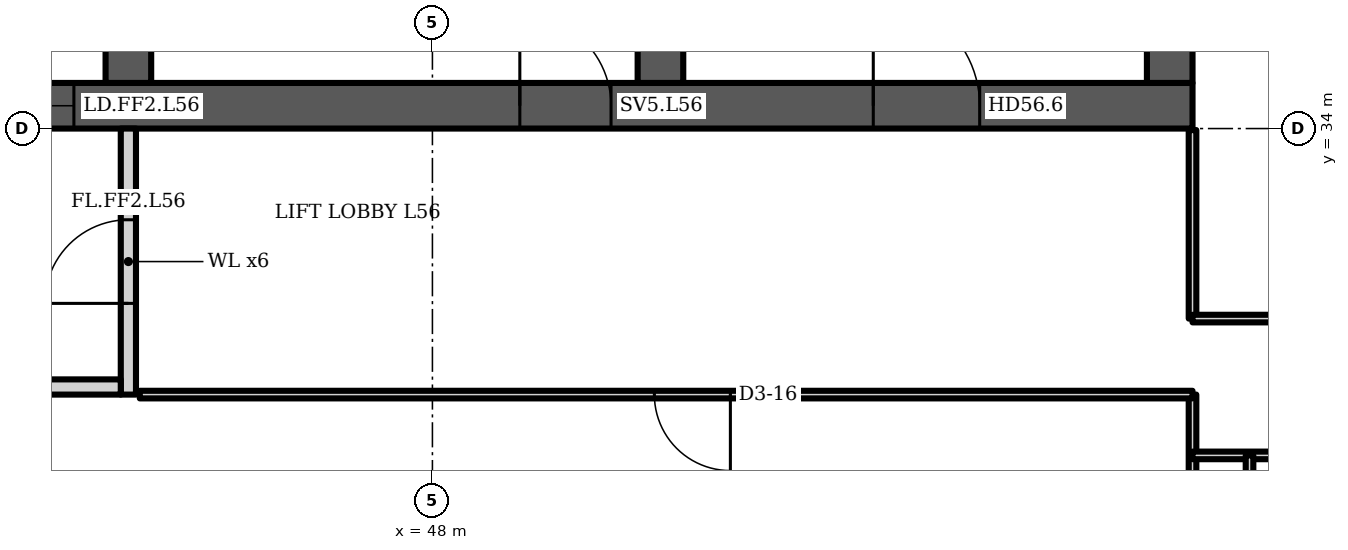
"""IFC4 building model, lengths in metres.
Left out: names, types, materials, properties, quantities, classifications, styles, units other than length and angle.
Written with IfcOpenShell. Run it as: python <this file> out.ifc"""

import sys

from ifc_helpers import new_model, si_unit, direction, frame, frame_2d, origin, place, context, subcontext, project, spatial, polyline, rectangle, outline, extrude, element, fill, save


model = new_model("IFC4")
c1 = context("Model", 3, precision=1e-05, world=origin(), true_north=direction((0.0, 1.0)))
c2 = subcontext(c1, "Body", "Model", "MODEL_VIEW")
j1 = project(units=[si_unit("LENGTHUNIT", "METRE"), si_unit("PLANEANGLEUNIT", "RADIAN")], contexts=[c1])
p1 = place(None, origin())
s1 = spatial("IfcSite", under=j1, at=p1, CompositionType="ELEMENT")
p2 = place(p1, origin())
s2 = spatial("IfcBuilding", under=s1, at=p2, CompositionType="ELEMENT")
p3 = place(p2, frame((0.0, 0.0, 225.1)))
s3 = spatial("IfcBuildingStorey", under=s2, at=p3, CompositionType="ELEMENT", Elevation=225.1)
p4 = place(p3, frame((23.0, 34.3, 0.0), z_axis=(0.0, 0.0, 1.0), x_axis=(1.0, 0.0, 0.0)))
e1 = element("IfcWall", 1, at=p4, inside=s3, PredefinedType="SHEAR", context=c2, shape_type="SweptSolid", body=[
    extrude(rectangle(XDim=35.0, YDim=0.6, at=frame_2d((17.5, 0.0))), origin(), (0.0, 0.0, 1.0), 3.6),
])
p5 = place(p4, frame((0.65, 0.0, 0.0)))
e2 = element("IfcOpeningElement", 2, at=p5, cuts=e1, PredefinedType="OPENING", context=c2, shape_type="SweptSolid", body=[
    extrude(rectangle(XDim=1.2, YDim=2.1, at=frame_2d((0.6, 1.05))), frame((0.0, 0.31, 0.0), z_axis=(0.0, -1.0, 0.0), x_axis=(1.0, 0.0, 0.0)), (0.0, 0.0, 1.0), 0.62),
])
p6 = place(p4, frame((7.717, 0.0, 0.0)))
e3 = element("IfcOpeningElement", 3, at=p6, cuts=e1, PredefinedType="OPENING", context=c2, shape_type="SweptSolid", body=[
    extrude(rectangle(XDim=1.1, YDim=2.1, at=frame_2d((0.55, 1.05))), frame((0.0, 0.31, 0.0), z_axis=(0.0, -1.0, 0.0), x_axis=(1.0, 0.0, 0.0)), (0.0, 0.0, 1.0), 0.62),
])
p7 = place(p4, frame((12.183, 0.0, 0.0)))
e4 = element("IfcOpeningElement", 4, at=p7, cuts=e1, PredefinedType="OPENING", context=c2, shape_type="SweptSolid", body=[
    extrude(rectangle(XDim=1.1, YDim=2.1, at=frame_2d((0.55, 1.05))), frame((0.0, 0.31, 0.0), z_axis=(0.0, -1.0, 0.0), x_axis=(1.0, 0.0, 0.0)), (0.0, 0.0, 1.0), 0.62),
])
p8 = place(p4, frame((9.8, 0.0, 0.0)))
e5 = element("IfcOpeningElement", 5, at=p8, cuts=e1, PredefinedType="OPENING", context=c2, shape_type="SweptSolid", body=[
    extrude(rectangle(XDim=1.4, YDim=2.1, at=frame_2d((0.7, 1.05))), frame((0.0, 0.31, 0.0), z_axis=(0.0, -1.0, 0.0), x_axis=(1.0, 0.0, 0.0)), (0.0, 0.0, 1.0), 0.62),
])
p9 = place(p4, frame((14.717, 0.0, 0.0)))
e6 = element("IfcOpeningElement", 6, at=p9, cuts=e1, PredefinedType="OPENING", context=c2, shape_type="SweptSolid", body=[
    extrude(rectangle(XDim=1.1, YDim=2.1, at=frame_2d((0.55, 1.05))), frame((0.0, 0.31, 0.0), z_axis=(0.0, -1.0, 0.0), x_axis=(1.0, 0.0, 0.0)), (0.0, 0.0, 1.0), 0.62),
])
p10 = place(p4, frame((16.95, 0.0, 0.0)))
e7 = element("IfcOpeningElement", 7, at=p10, cuts=e1, PredefinedType="OPENING", context=c2, shape_type="SweptSolid", body=[
    extrude(rectangle(XDim=1.1, YDim=2.1, at=frame_2d((0.55, 1.05))), frame((0.0, 0.31, 0.0), z_axis=(0.0, -1.0, 0.0), x_axis=(1.0, 0.0, 0.0)), (0.0, 0.0, 1.0), 0.62),
])
p11 = place(p4, frame((19.183, 0.0, 0.0)))
e8 = element("IfcOpeningElement", 8, at=p11, cuts=e1, PredefinedType="OPENING", context=c2, shape_type="SweptSolid", body=[
    extrude(rectangle(XDim=1.1, YDim=2.1, at=frame_2d((0.55, 1.05))), frame((0.0, 0.31, 0.0), z_axis=(0.0, -1.0, 0.0), x_axis=(1.0, 0.0, 0.0)), (0.0, 0.0, 1.0), 0.62),
])
p12 = place(p4, frame((26.15, 0.0, 0.0)))
e9 = element("IfcOpeningElement", 9, at=p12, cuts=e1, PredefinedType="OPENING", context=c2, shape_type="SweptSolid", body=[
    extrude(rectangle(XDim=1.2, YDim=2.1, at=frame_2d((0.6, 1.05))), frame((0.0, 0.31, 0.0), z_axis=(0.0, -1.0, 0.0), x_axis=(1.0, 0.0, 0.0)), (0.0, 0.0, 1.0), 0.62),
])
p13 = place(p4, frame((30.8, 0.0, 0.0)))
e10 = element("IfcOpeningElement", 10, at=p13, cuts=e1, PredefinedType="OPENING", context=c2, shape_type="SweptSolid", body=[
    extrude(rectangle(XDim=1.4, YDim=2.1, at=frame_2d((0.7, 1.05))), frame((0.0, 0.31, 0.0), z_axis=(0.0, -1.0, 0.0), x_axis=(1.0, 0.0, 0.0)), (0.0, 0.0, 1.0), 0.62),
])
p14 = place(p3, frame((44.0, 34.6, 0.0), z_axis=(0.0, 0.0, 1.0), x_axis=(0.0, 1.0, 0.0)))
e11 = element("IfcWall", 11, at=p14, inside=s3, PredefinedType="SHEAR", context=c2, shape_type="SweptSolid", body=[
    extrude(rectangle(XDim=14.784, YDim=0.6, at=frame_2d((7.392, 0.0))), origin(), (0.0, 0.0, 1.0), 3.6),
])
p15 = place(p14, frame((11.608, 0.0, 0.0)))
e12 = element("IfcOpeningElement", 12, at=p15, cuts=e11, PredefinedType="OPENING", context=c2, shape_type="SweptSolid", body=[
    extrude(rectangle(XDim=1.0, YDim=2.1, at=frame_2d((0.5, 1.05))), frame((0.0, 0.31, 0.0), z_axis=(0.0, -1.0, 0.0), x_axis=(1.0, 0.0, 0.0)), (0.0, 0.0, 1.0), 0.62),
])
p16 = place(p14, frame((3.8, 0.0, 0.0)))
e13 = element("IfcOpeningElement", 13, at=p16, cuts=e11, PredefinedType="OPENING", context=c2, shape_type="SweptSolid", body=[
    extrude(rectangle(XDim=1.1, YDim=2.1, at=frame_2d((0.55, 1.05))), frame((0.0, 0.31, 0.0), z_axis=(0.0, -1.0, 0.0), x_axis=(1.0, 0.0, 0.0)), (0.0, 0.0, 1.0), 0.62),
])
p17 = place(p3, frame((51.0, 34.6, 0.0), z_axis=(0.0, 0.0, 1.0), x_axis=(0.0, 1.0, 0.0)))
e14 = element("IfcWall", 14, at=p17, inside=s3, PredefinedType="SHEAR", context=c2, shape_type="SweptSolid", body=[
    extrude(rectangle(XDim=14.171, YDim=0.6, at=frame_2d((7.085, 0.0))), origin(), (0.0, 0.0, 1.0), 3.6),
])
p18 = place(p17, frame((3.8, 0.0, 0.0)))
e15 = element("IfcOpeningElement", 15, at=p18, cuts=e14, PredefinedType="OPENING", context=c2, shape_type="SweptSolid", body=[
    extrude(rectangle(XDim=1.1, YDim=2.1, at=frame_2d((0.55, 1.05))), frame((0.0, 0.31, 0.0), z_axis=(0.0, -1.0, 0.0), x_axis=(1.0, 0.0, 0.0)), (0.0, 0.0, 1.0), 0.62),
])
p19 = place(p3, frame((57.7, 34.6, 0.0), z_axis=(0.0, 0.0, 1.0), x_axis=(0.0, 1.0, 0.0)))
e16 = element("IfcWall", 16, at=p19, inside=s3, PredefinedType="SHEAR", context=c2, shape_type="SweptSolid", body=[
    extrude(rectangle(XDim=13.585, YDim=0.6, at=frame_2d((6.792, 0.0))), origin(), (0.0, 0.0, 1.0), 3.6),
])
p20 = place(p3, frame((0.0, 0.0, -0.0)))
e17 = element("IfcWall", 17, at=p20, inside=s3, PredefinedType="PARTITIONING", context=c2, shape_type="SweptSolid", body=[
    extrude(outline(polyline([(41.567, 37.1), (39.433, 37.1), (39.433, 34.6), (39.233, 34.6), (39.233, 37.45), (37.3, 37.45), (37.3, 37.65), (39.233, 37.65), (39.433, 37.65), (39.433, 37.3), (41.567, 37.3), (41.567, 37.35), (41.767, 37.35), (43.7, 37.35), (43.7, 37.15), (41.767, 37.15), (41.767, 34.6), (41.567, 34.6), (41.567, 37.1)])), origin(), (0.0, 0.0, 1.0), 3.2),
])
p21 = place(p3, frame((44.0, 30.5, 0.0), z_axis=(0.0, 0.0, 1.0), x_axis=(0.0, 1.0, 0.0)))
e18 = element("IfcWall", 18, at=p21, inside=s3, PredefinedType="PARTITIONING", context=c2, shape_type="SweptSolid", body=[
    extrude(rectangle(XDim=3.5, YDim=0.2, at=frame_2d((1.75, 0.0))), origin(), (0.0, 0.0, 1.0), 3.2),
])
p22 = place(p21, frame((1.2, 0.0, 0.0)))
e19 = element("IfcOpeningElement", 19, at=p22, cuts=e18, PredefinedType="OPENING", context=c2, shape_type="SweptSolid", body=[
    extrude(rectangle(XDim=1.1, YDim=2.1, at=frame_2d((0.55, 1.05))), frame((0.0, 0.11, 0.0), z_axis=(0.0, -1.0, 0.0), x_axis=(1.0, 0.0, 0.0)), (0.0, 0.0, 1.0), 0.22),
])
p23 = place(p3, frame((41.1, 30.6, 0.0), z_axis=(0.0, 0.0, 1.0), x_axis=(1.0, 0.0, 0.0)))
e20 = element("IfcWall", 20, at=p23, inside=s3, PredefinedType="PARTITIONING", context=c2, shape_type="SweptSolid", body=[
    extrude(rectangle(XDim=2.8, YDim=0.2, at=frame_2d((1.4, 0.0))), origin(), (0.0, 0.0, 1.0), 3.2),
])
p24 = place(p3, frame((58.0, 17.0, 0.0), z_axis=(0.0, 0.0, 1.0), x_axis=(0.0, 1.0, 0.0)))
e21 = element("IfcWall", 21, at=p24, inside=s3, PredefinedType="PARTITIONING", context=c2, shape_type="SweptSolid", body=[
    extrude(rectangle(XDim=13.5, YDim=0.1, at=frame_2d((6.75, 0.0))), origin(), (0.0, 0.0, 1.0), 3.2),
])
p25 = place(p3, frame((58.0, 29.7, 0.0), z_axis=(0.0, 0.0, 1.0), x_axis=(1.0, 0.0, 0.0)))
e22 = element("IfcWall", 22, at=p25, inside=s3, PredefinedType="PARTITIONING", context=c2, shape_type="SweptSolid", body=[
    extrude(rectangle(XDim=3.58, YDim=0.1, at=frame_2d((1.79, 0.0))), origin(), (0.0, 0.0, 1.0), 3.2),
])
p26 = place(p3, frame((58.0, 31.5, 0.0), z_axis=(0.0, 0.0, 1.0), x_axis=(0.0, 1.0, 0.0)))
e23 = element("IfcWall", 23, at=p26, inside=s3, PredefinedType="PARTITIONING", context=c2, shape_type="SweptSolid", body=[
    extrude(rectangle(XDim=2.48, YDim=0.1, at=frame_2d((1.24, 0.0))), origin(), (0.0, 0.0, 1.0), 3.2),
])
p27 = place(p3, frame((58.0, 31.5, 0.0), z_axis=(0.0, 0.0, 1.0), x_axis=(1.0, 0.0, 0.0)))
e24 = element("IfcWall", 24, at=p27, inside=s3, PredefinedType="PARTITIONING", context=c2, shape_type="SweptSolid", body=[
    extrude(rectangle(XDim=5.38, YDim=0.1, at=frame_2d((2.69, 0.0))), origin(), (0.0, 0.0, 1.0), 3.2),
])
p28 = place(p27, frame((4.135, 0.0, 0.0)))
e25 = element("IfcOpeningElement", 25, at=p28, cuts=e24, PredefinedType="OPENING", context=c2, shape_type="SweptSolid", body=[
    extrude(rectangle(XDim=1.0, YDim=2.1, at=frame_2d((0.5, 1.05))), frame((0.0, 0.06, 0.0), z_axis=(0.0, -1.0, 0.0), x_axis=(1.0, 0.0, 0.0)), (0.0, 0.0, 1.0), 0.12),
])
p29 = place(p3, frame((58.75, 23.35, 0.0), z_axis=(0.0, 0.0, 1.0), x_axis=(0.0, 1.0, 0.0)))
e26 = element("IfcWall", 26, at=p29, inside=s3, PredefinedType="PARTITIONING", context=c2, shape_type="SweptSolid", body=[
    extrude(rectangle(XDim=6.35, YDim=0.1, at=frame_2d((3.175, 0.0))), origin(), (0.0, 0.0, 1.0), 3.2),
])
p30 = place(p3, frame((44.15, 30.5, 0.0), z_axis=(0.0, 0.0, 1.0), x_axis=(1.0, 0.0, 0.0)))
e27 = element("IfcWall", 27, at=p30, inside=s3, PredefinedType="PARTITIONING", context=c2, shape_type="SweptSolid", body=[
    extrude(rectangle(XDim=13.85, YDim=0.1, at=frame_2d((6.925, 0.0))), origin(), (0.0, 0.0, 1.0), 3.2),
])
p31 = place(p30, frame((6.77, 0.0, 0.0)))
e28 = element("IfcOpeningElement", 28, at=p31, cuts=e27, PredefinedType="OPENING", context=c2, shape_type="SweptSolid", body=[
    extrude(rectangle(XDim=1.0, YDim=2.1, at=frame_2d((0.5, 1.05))), frame((0.0, 0.06, 0.0), z_axis=(0.0, -1.0, 0.0), x_axis=(1.0, 0.0, 0.0)), (0.0, 0.0, 1.0), 0.12),
])
p32 = place(p11, origin())
e29 = element("IfcDoor", 29, at=p32, inside=s3, OperationType="DOUBLE_DOOR_SLIDING", PredefinedType="DOOR", context=c2, shape_type="SweptSolid", body=[
    extrude(rectangle(XDim=1.1, YDim=2.1, at=frame_2d((0.55, 1.05))), frame((0.0, 0.025, 0.0), z_axis=(0.0, -1.0, 0.0), x_axis=(1.0, 0.0, 0.0)), (0.0, 0.0, 1.0), 0.05),
])
fill(e8, e29)
p33 = place(p12, origin())
e30 = element("IfcDoor", 30, at=p33, inside=s3, OperationType="SINGLE_SWING_LEFT", PredefinedType="DOOR", context=c2, shape_type="SweptSolid", body=[
    extrude(rectangle(XDim=1.2, YDim=2.1, at=frame_2d((0.6, 1.05))), frame((0.0, 0.025, 0.0), z_axis=(0.0, -1.0, 0.0), x_axis=(1.0, 0.0, 0.0)), (0.0, 0.0, 1.0), 0.05),
])
fill(e9, e30)
p34 = place(p13, origin())
e31 = element("IfcDoor", 31, at=p34, inside=s3, OperationType="DOUBLE_DOOR_SINGLE_SWING", PredefinedType="DOOR", context=c2, shape_type="SweptSolid", body=[
    extrude(rectangle(XDim=1.4, YDim=2.1, at=frame_2d((0.7, 1.05))), frame((0.0, 0.025, 0.0), z_axis=(0.0, -1.0, 0.0), x_axis=(1.0, 0.0, 0.0)), (0.0, 0.0, 1.0), 0.05),
])
fill(e10, e31)
p35 = place(p22, origin())
e32 = element("IfcDoor", 32, at=p35, inside=s3, OperationType="SINGLE_SWING_LEFT", PredefinedType="DOOR", context=c2, shape_type="SweptSolid", body=[
    extrude(rectangle(XDim=1.1, YDim=2.1, at=frame_2d((0.55, 1.05))), frame((0.0, 0.025, 0.0), z_axis=(0.0, -1.0, 0.0), x_axis=(1.0, 0.0, 0.0)), (0.0, 0.0, 1.0), 0.05),
])
fill(e19, e32)
p36 = place(p31, origin())
e33 = element("IfcDoor", 33, at=p36, inside=s3, OperationType="SINGLE_SWING_RIGHT", PredefinedType="DOOR", context=c2, shape_type="SweptSolid", body=[
    extrude(rectangle(XDim=1.0, YDim=2.1, at=frame_2d((0.5, 1.05))), frame((0.0, 0.025, 0.0), z_axis=(0.0, -1.0, 0.0), x_axis=(1.0, 0.0, 0.0)), (0.0, 0.0, 1.0), 0.05),
])
fill(e28, e33)
save(model, sys.argv[1])
